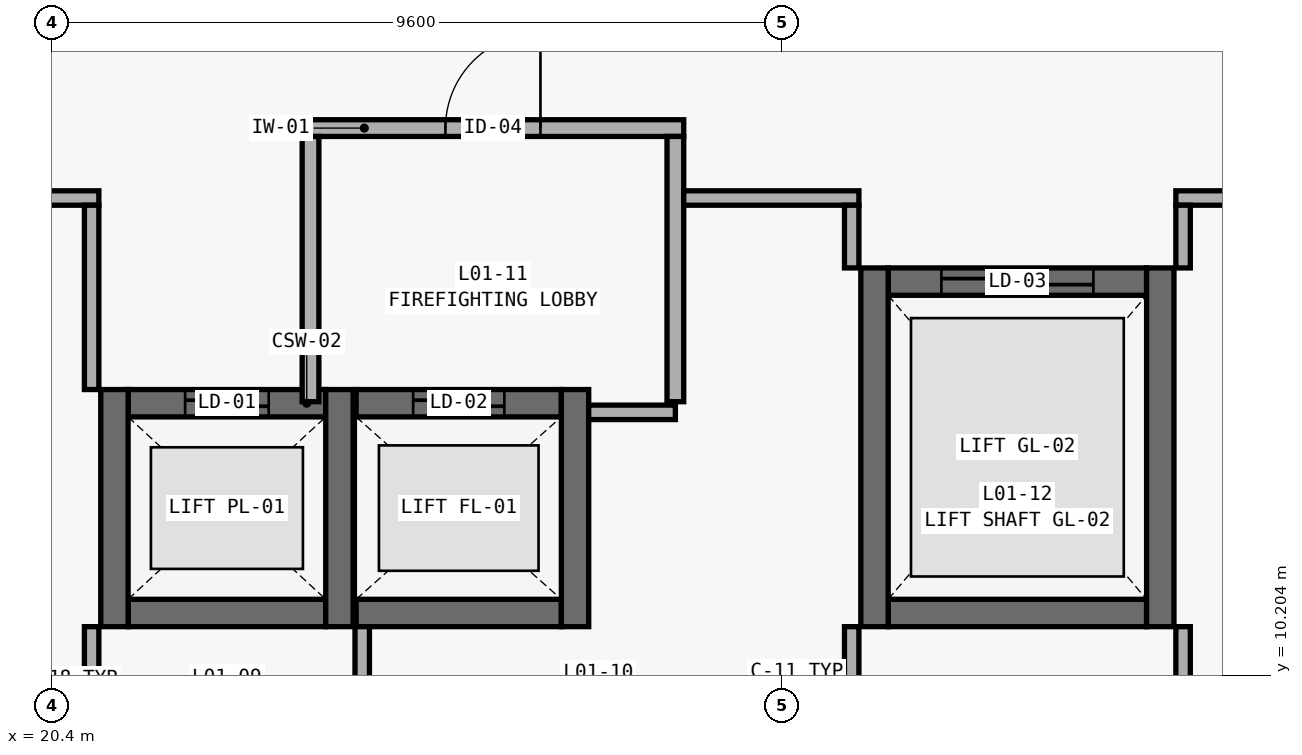
"""IFC4 building model, lengths in metres.
Left out: names, types, materials, properties, quantities, classifications, styles, units other than length and angle.
Written with IfcOpenShell. Run it as: python <this file> out.ifc"""

import sys

from ifc_helpers import new_model, si_unit, direction, frame, frame_2d, origin, place, context, subcontext, project, spatial, rectangle, extrude, element, fill, save


model = new_model("IFC4")
c1 = context("Model", 3, precision=1e-05, world=origin(), true_north=direction((0.0, 1.0)))
c2 = subcontext(c1, "Body", "Model", "MODEL_VIEW")
j1 = project(units=[si_unit("LENGTHUNIT", "METRE"), si_unit("PLANEANGLEUNIT", "RADIAN")], contexts=[c1])
p1 = place(None, origin())
s1 = spatial("IfcSite", under=j1, at=p1, CompositionType="ELEMENT")
p2 = place(p1, origin())
s2 = spatial("IfcBuilding", under=s1, at=p2, CompositionType="ELEMENT")
p3 = place(p2, frame((0.0, 0.0, 4.8)))
s3 = spatial("IfcBuildingStorey", under=s2, at=p3, CompositionType="ELEMENT", Elevation=4.8)
p4 = place(p3, frame((21.4, 13.78, 0.0), z_axis=(0.0, 0.0, 1.0), x_axis=(1.0, 0.0, 0.0)))
e1 = element("IfcWall", 1, at=p4, inside=s3, PredefinedType="SHEAR", context=c2, shape_type="SweptSolid", body=[
    extrude(rectangle(XDim=2.6, YDim=0.36, at=frame_2d((1.3, 0.0))), origin(), (0.0, 0.0, 1.0), 3.88),
])
p5 = place(p4, frame((0.75, 0.0, 0.0)))
e2 = element("IfcOpeningElement", 2, at=p5, cuts=e1, PredefinedType="OPENING", context=c2, shape_type="SweptSolid", body=[
    extrude(rectangle(XDim=1.1, YDim=2.15, at=frame_2d((0.55, 1.075))), frame((0.0, 0.195, 0.0), z_axis=(0.0, -1.0, 0.0), x_axis=(1.0, 0.0, 0.0)), (0.0, 0.0, 1.0), 0.39),
])
p6 = place(p3, frame((21.4, 11.02, 0.0), z_axis=(0.0, 0.0, 1.0), x_axis=(1.0, 0.0, 0.0)))
e3 = element("IfcWall", 3, at=p6, inside=s3, PredefinedType="SHEAR", context=c2, shape_type="SweptSolid", body=[
    extrude(rectangle(XDim=2.6, YDim=0.36, at=frame_2d((1.3, 0.0))), origin(), (0.0, 0.0, 1.0), 3.88),
])
for number, where, z_axis, x_axis in (
    (4, (21.22, 10.84, 0.0), (0.0, 0.0, 1.0), (0.0, 1.0, 0.0)),
    (5, (24.18, 10.84, 0.0), (0.0, 0.0, 1.0), (0.0, 1.0, 0.0)),
):
    element("IfcWall", number, at=place(p3, frame(where, z_axis=z_axis, x_axis=x_axis)), inside=s3, PredefinedType="SHEAR", context=c2, shape_type="SweptSolid", body=[
        extrude(rectangle(XDim=3.12, YDim=0.36, at=frame_2d((1.56, 0.0))), origin(), (0.0, 0.0, 1.0), 3.88),
    ])
p7 = place(p3, frame((24.4, 13.78, 0.0), z_axis=(0.0, 0.0, 1.0), x_axis=(1.0, 0.0, 0.0)))
e6 = element("IfcWall", 6, at=p7, inside=s3, PredefinedType="SHEAR", context=c2, shape_type="SweptSolid", body=[
    extrude(rectangle(XDim=2.7, YDim=0.36, at=frame_2d((1.35, 0.0))), origin(), (0.0, 0.0, 1.0), 3.88),
])
p8 = place(p7, frame((0.75, 0.0, 0.0)))
e7 = element("IfcOpeningElement", 7, at=p8, cuts=e6, PredefinedType="OPENING", context=c2, shape_type="SweptSolid", body=[
    extrude(rectangle(XDim=1.2, YDim=2.15, at=frame_2d((0.6, 1.075))), frame((0.0, 0.195, 0.0), z_axis=(0.0, -1.0, 0.0), x_axis=(1.0, 0.0, 0.0)), (0.0, 0.0, 1.0), 0.39),
])
p9 = place(p3, frame((24.4, 11.02, 0.0), z_axis=(0.0, 0.0, 1.0), x_axis=(1.0, 0.0, 0.0)))
e8 = element("IfcWall", 8, at=p9, inside=s3, PredefinedType="SHEAR", context=c2, shape_type="SweptSolid", body=[
    extrude(rectangle(XDim=2.7, YDim=0.36, at=frame_2d((1.35, 0.0))), origin(), (0.0, 0.0, 1.0), 3.88),
])
p10 = place(p3, frame((27.28, 10.84, 0.0), z_axis=(0.0, 0.0, 1.0), x_axis=(0.0, 1.0, 0.0)))
e9 = element("IfcWall", 9, at=p10, inside=s3, PredefinedType="SHEAR", context=c2, shape_type="SweptSolid", body=[
    extrude(rectangle(XDim=3.12, YDim=0.36, at=frame_2d((1.56, 0.0))), origin(), (0.0, 0.0, 1.0), 3.88),
])
p11 = place(p3, frame((23.69, 17.4, 0.0), z_axis=(0.0, 0.0, 1.0), x_axis=(1.0, 0.0, 0.0)))
e10 = element("IfcWall", 10, at=p11, inside=s3, PredefinedType="PARTITIONING", context=c2, shape_type="SweptSolid", body=[
    extrude(rectangle(XDim=5.02, YDim=0.22, at=frame_2d((2.51, 0.0))), origin(), (0.0, 0.0, 1.0), 2.76),
])
p12 = place(p11, frame((1.885, 0.0, 0.0)))
e11 = element("IfcOpeningElement", 11, at=p12, cuts=e10, PredefinedType="OPENING", context=c2, shape_type="SweptSolid", body=[
    extrude(rectangle(XDim=1.25, YDim=2.15, at=frame_2d((0.625, 1.075))), frame((0.0, 0.125, 0.0), z_axis=(0.0, -1.0, 0.0), x_axis=(1.0, 0.0, 0.0)), (0.0, 0.0, 1.0), 0.25),
])
for number, where, z_axis, x_axis in (
    (12, (23.8, 13.8, 0.0), (0.0, 0.0, 1.0), (0.0, 1.0, 0.0)),
    (13, (28.6, 13.8, 0.0), (0.0, 0.0, 1.0), (0.0, 1.0, 0.0)),
):
    element("IfcWall", number, at=place(p3, frame(where, z_axis=z_axis, x_axis=x_axis)), inside=s3, PredefinedType="PARTITIONING", context=c2, shape_type="SweptSolid", body=[
        extrude(rectangle(XDim=3.49, YDim=0.22, at=frame_2d((1.745, 0.0))), origin(), (0.0, 0.0, 1.0), 2.76),
    ])
p13 = place(p3, frame((31.4, 15.38, 0.0), z_axis=(0.0, 0.0, 1.0), x_axis=(1.0, 0.0, 0.0)))
e14 = element("IfcWall", 14, at=p13, inside=s3, PredefinedType="SHEAR", context=c2, shape_type="SweptSolid", body=[
    extrude(rectangle(XDim=3.4, YDim=0.36, at=frame_2d((1.7, 0.0))), origin(), (0.0, 0.0, 1.0), 3.88),
])
p14 = place(p13, frame((0.7, 0.0, 0.0)))
e15 = element("IfcOpeningElement", 15, at=p14, cuts=e14, PredefinedType="OPENING", context=c2, shape_type="SweptSolid", body=[
    extrude(rectangle(XDim=2.0, YDim=2.4, at=frame_2d((1.0, 1.2))), frame((0.0, 0.195, 0.0), z_axis=(0.0, -1.0, 0.0), x_axis=(1.0, 0.0, 0.0)), (0.0, 0.0, 1.0), 0.39),
])
p15 = place(p3, frame((31.4, 11.02, 0.0), z_axis=(0.0, 0.0, 1.0), x_axis=(1.0, 0.0, 0.0)))
e16 = element("IfcWall", 16, at=p15, inside=s3, PredefinedType="SHEAR", context=c2, shape_type="SweptSolid", body=[
    extrude(rectangle(XDim=3.4, YDim=0.36, at=frame_2d((1.7, 0.0))), origin(), (0.0, 0.0, 1.0), 3.88),
])
for number, where, z_axis, x_axis in (
    (17, (31.22, 10.84, 0.0), (0.0, 0.0, 1.0), (0.0, 1.0, 0.0)),
    (18, (34.98, 10.84, 0.0), (0.0, 0.0, 1.0), (0.0, 1.0, 0.0)),
):
    element("IfcWall", number, at=place(p3, frame(where, z_axis=z_axis, x_axis=x_axis)), inside=s3, PredefinedType="SHEAR", context=c2, shape_type="SweptSolid", body=[
        extrude(rectangle(XDim=4.72, YDim=0.36, at=frame_2d((2.36, 0.0))), origin(), (0.0, 0.0, 1.0), 3.88),
    ])
p16 = place(p3, frame((27.46, 13.66, 0.0), z_axis=(0.0, 0.0, 1.0), x_axis=(1.0, 0.0, 0.0)))
e19 = element("IfcWall", 19, at=p16, inside=s3, PredefinedType="PARTITIONING", context=c2, shape_type="SweptSolid", body=[
    extrude(rectangle(XDim=1.14, YDim=0.19, at=frame_2d((0.57, 0.0))), origin(), (0.0, 0.0, 1.0), 2.76),
])
p17 = place(p3, frame((19.685, 16.48, 0.0), z_axis=(0.0, 0.0, 1.0), x_axis=(1.0, 0.0, 0.0)))
e20 = element("IfcWall", 20, at=p17, inside=s3, PredefinedType="PARTITIONING", context=c2, shape_type="SweptSolid", body=[
    extrude(rectangle(XDim=1.33, YDim=0.19, at=frame_2d((0.665, 0.0))), origin(), (0.0, 0.0, 1.0), 2.76),
])
p18 = place(p3, frame((28.71, 16.48, 0.0), z_axis=(0.0, 0.0, 1.0), x_axis=(1.0, 0.0, 0.0)))
e21 = element("IfcWall", 21, at=p18, inside=s3, PredefinedType="PARTITIONING", context=c2, shape_type="SweptSolid", body=[
    extrude(rectangle(XDim=2.305, YDim=0.19, at=frame_2d((1.152, 0.0))), origin(), (0.0, 0.0, 1.0), 2.76),
])
p19 = place(p3, frame((35.185, 16.48, 0.0), z_axis=(0.0, 0.0, 1.0), x_axis=(1.0, 0.0, 0.0)))
e22 = element("IfcWall", 22, at=p19, inside=s3, PredefinedType="PARTITIONING", context=c2, shape_type="SweptSolid", body=[
    extrude(rectangle(XDim=9.03, YDim=0.19, at=frame_2d((4.515, 0.0))), origin(), (0.0, 0.0, 1.0), 2.76),
])
p20 = place(p3, frame((20.92, 9.015, 0.0), z_axis=(0.0, 0.0, 1.0), x_axis=(0.0, 1.0, 0.0)))
e23 = element("IfcWall", 23, at=p20, inside=s3, PredefinedType="PARTITIONING", context=c2, shape_type="SweptSolid", body=[
    extrude(rectangle(XDim=1.825, YDim=0.19, at=frame_2d((0.913, 0.0))), origin(), (0.0, 0.0, 1.0), 2.76),
])
p21 = place(p3, frame((20.92, 13.96, 0.0), z_axis=(0.0, 0.0, 1.0), x_axis=(0.0, 1.0, 0.0)))
e24 = element("IfcWall", 24, at=p21, inside=s3, PredefinedType="PARTITIONING", context=c2, shape_type="SweptSolid", body=[
    extrude(rectangle(XDim=2.425, YDim=0.19, at=frame_2d((1.212, 0.0))), origin(), (0.0, 0.0, 1.0), 2.76),
])
for number, where, z_axis, x_axis in (
    (25, (24.48, 9.015, 0.0), (0.0, 0.0, 1.0), (0.0, 1.0, 0.0)),
    (26, (30.92, 9.015, 0.0), (0.0, 0.0, 1.0), (0.0, 1.0, 0.0)),
):
    element("IfcWall", number, at=place(p3, frame(where, z_axis=z_axis, x_axis=x_axis)), inside=s3, PredefinedType="PARTITIONING", context=c2, shape_type="SweptSolid", body=[
        extrude(rectangle(XDim=1.825, YDim=0.19, at=frame_2d((0.913, 0.0))), origin(), (0.0, 0.0, 1.0), 2.76),
    ])
p22 = place(p3, frame((30.92, 15.56, 0.0), z_axis=(0.0, 0.0, 1.0), x_axis=(0.0, 1.0, 0.0)))
e27 = element("IfcWall", 27, at=p22, inside=s3, PredefinedType="PARTITIONING", context=c2, shape_type="SweptSolid", body=[
    extrude(rectangle(XDim=0.825, YDim=0.19, at=frame_2d((0.413, 0.0))), origin(), (0.0, 0.0, 1.0), 2.76),
])
p23 = place(p3, frame((35.28, 9.015, 0.0), z_axis=(0.0, 0.0, 1.0), x_axis=(0.0, 1.0, 0.0)))
e28 = element("IfcWall", 28, at=p23, inside=s3, PredefinedType="PARTITIONING", context=c2, shape_type="SweptSolid", body=[
    extrude(rectangle(XDim=1.825, YDim=0.19, at=frame_2d((0.913, 0.0))), origin(), (0.0, 0.0, 1.0), 2.76),
])
p24 = place(p3, frame((35.28, 15.56, 0.0), z_axis=(0.0, 0.0, 1.0), x_axis=(0.0, 1.0, 0.0)))
e29 = element("IfcWall", 29, at=p24, inside=s3, PredefinedType="PARTITIONING", context=c2, shape_type="SweptSolid", body=[
    extrude(rectangle(XDim=0.825, YDim=0.19, at=frame_2d((0.413, 0.0))), origin(), (0.0, 0.0, 1.0), 2.76),
])
p25 = place(p5, origin())
e30 = element("IfcDoor", 30, at=p25, inside=s3, OperationType="DOUBLE_DOOR_SLIDING", PredefinedType="DOOR", context=c2, shape_type="SweptSolid", body=[
    extrude(rectangle(XDim=1.1, YDim=2.15, at=frame_2d((0.55, 1.075))), frame((0.0, 0.025, 0.0), z_axis=(0.0, -1.0, 0.0), x_axis=(1.0, 0.0, 0.0)), (0.0, 0.0, 1.0), 0.05),
])
fill(e2, e30)
p26 = place(p8, origin())
e31 = element("IfcDoor", 31, at=p26, inside=s3, OperationType="DOUBLE_DOOR_SLIDING", PredefinedType="DOOR", context=c2, shape_type="SweptSolid", body=[
    extrude(rectangle(XDim=1.2, YDim=2.15, at=frame_2d((0.6, 1.075))), frame((0.0, 0.025, 0.0), z_axis=(0.0, -1.0, 0.0), x_axis=(1.0, 0.0, 0.0)), (0.0, 0.0, 1.0), 0.05),
])
fill(e7, e31)
p27 = place(p12, origin())
e32 = element("IfcDoor", 32, at=p27, inside=s3, OperationType="SINGLE_SWING_RIGHT", PredefinedType="DOOR", context=c2, shape_type="SweptSolid", body=[
    extrude(rectangle(XDim=1.25, YDim=2.15, at=frame_2d((0.625, 1.075))), frame((0.0, 0.025, 0.0), z_axis=(0.0, -1.0, 0.0), x_axis=(1.0, 0.0, 0.0)), (0.0, 0.0, 1.0), 0.05),
])
fill(e11, e32)
p28 = place(p14, origin())
e33 = element("IfcDoor", 33, at=p28, inside=s3, OperationType="DOUBLE_DOOR_SLIDING", PredefinedType="DOOR", context=c2, shape_type="SweptSolid", body=[
    extrude(rectangle(XDim=2.0, YDim=2.4, at=frame_2d((1.0, 1.2))), frame((0.0, 0.025, 0.0), z_axis=(0.0, -1.0, 0.0), x_axis=(1.0, 0.0, 0.0)), (0.0, 0.0, 1.0), 0.05),
])
fill(e15, e33)
save(model, sys.argv[1])
